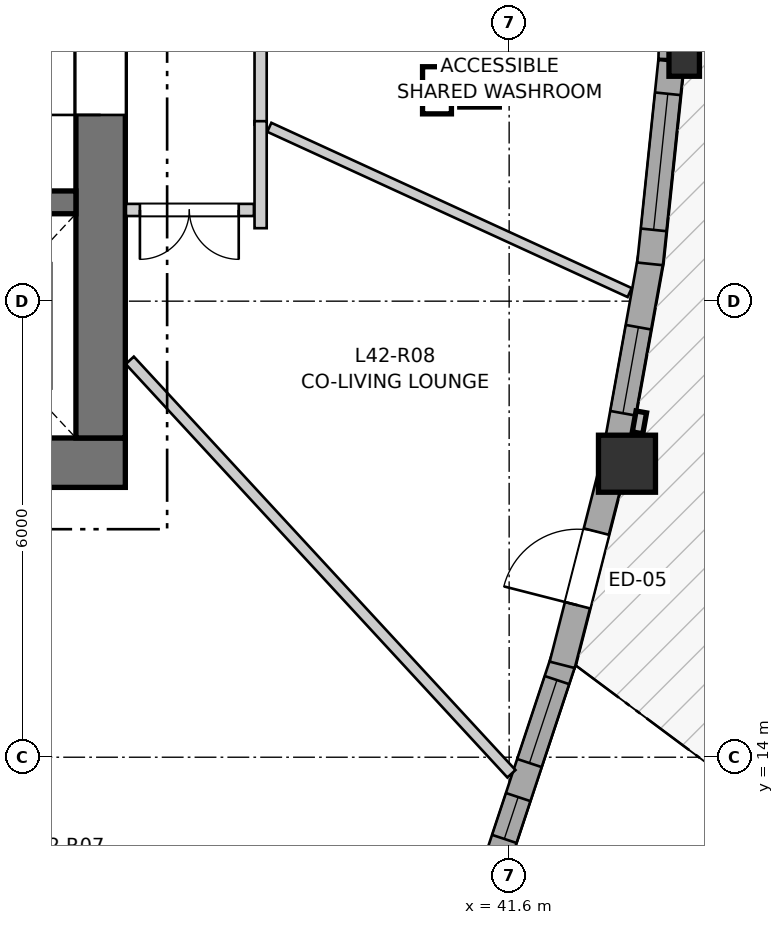
"""IFC4 building model, lengths in metres.
Left out: names, types, materials, properties, quantities, classifications, styles, units other than length and angle.
Written with IfcOpenShell. Run it as: python <this file> out.ifc"""

import sys

from ifc_helpers import new_model, si_unit, direction, frame, frame_2d, origin, origin_2d, place, context, subcontext, project, spatial, rectangle, i_section, extrude, source, transform, mapped, element, fill, save


model = new_model("IFC4")
c1 = context("Model", 3, precision=1e-05, world=origin(), true_north=direction((0.0, 1.0)))
c2 = subcontext(c1, "Body", "Model", "MODEL_VIEW")
j1 = project(units=[si_unit("LENGTHUNIT", "METRE"), si_unit("PLANEANGLEUNIT", "RADIAN")], contexts=[c1])
p1 = place(None, origin())
s1 = spatial("IfcSite", under=j1, at=p1, CompositionType="ELEMENT")
p2 = place(p1, origin())
s2 = spatial("IfcBuilding", under=s1, at=p2, CompositionType="ELEMENT")
p3 = place(p2, frame((0.0, 0.0, 142.6)))
s3 = spatial("IfcBuildingStorey", under=s2, at=p3, CompositionType="ELEMENT", Elevation=142.6)
p4 = place(p3, frame((24.15, 17.875, 0.0), z_axis=(0.0, 0.0, 1.0), x_axis=(1.0, 0.0, 0.0)))
e1 = element("IfcWall", 1, at=p4, inside=s3, PredefinedType="SHEAR", context=c2, shape_type="SweptSolid", body=[
    extrude(rectangle(XDim=12.4, YDim=0.65, at=frame_2d((6.2, 0.0))), origin(), (0.0, 0.0, 1.0), 2.95),
])
p5 = place(p3, frame((36.225, 18.2, 0.0), z_axis=(0.0, 0.0, 1.0), x_axis=(0.0, 1.0, 0.0)))
e2 = element("IfcWall", 2, at=p5, inside=s3, PredefinedType="SHEAR", context=c2, shape_type="SweptSolid", body=[
    extrude(rectangle(XDim=15.6, YDim=0.65, at=frame_2d((7.8, 0.0))), origin(), (0.0, 0.0, 1.0), 2.95),
])
p6 = place(p5, frame((4.25, 0.0, 0.0)))
e3 = element("IfcOpeningElement", 3, at=p6, cuts=e2, PredefinedType="OPENING", context=c2, shape_type="SweptSolid", body=[
    extrude(rectangle(XDim=1.1, YDim=2.15, at=frame_2d((0.55, 1.075))), frame((0.0, 0.335, 0.0), z_axis=(0.0, -1.0, 0.0), x_axis=(1.0, 0.0, 0.0)), (0.0, 0.0, 1.0), 0.67),
])
p7 = place(p5, frame((10.25, 0.0, 0.0)))
e4 = element("IfcOpeningElement", 4, at=p7, cuts=e2, PredefinedType="OPENING", context=c2, shape_type="SweptSolid", body=[
    extrude(rectangle(XDim=1.1, YDim=2.15, at=frame_2d((0.55, 1.075))), frame((0.0, 0.335, 0.0), z_axis=(0.0, -1.0, 0.0), x_axis=(1.0, 0.0, 0.0)), (0.0, 0.0, 1.0), 0.67),
])
p8 = place(p3, frame((24.8, 21.3, 0.0), z_axis=(0.0, 0.0, 1.0), x_axis=(1.0, 0.0, 0.0)))
e5 = element("IfcWall", 5, at=p8, inside=s3, PredefinedType="SHEAR", context=c2, shape_type="SweptSolid", body=[
    extrude(rectangle(XDim=11.1, YDim=0.3, at=frame_2d((5.55, 0.0))), origin(), (0.0, 0.0, 1.0), 2.95),
])
p9 = place(p8, frame((6.22, 0.0, 0.0)))
e6 = element("IfcOpeningElement", 6, at=p9, cuts=e5, PredefinedType="OPENING", context=c2, shape_type="SweptSolid", body=[
    extrude(rectangle(XDim=0.98, YDim=2.15, at=frame_2d((0.49, 1.075))), frame((0.0, 0.16, 0.0), z_axis=(0.0, -1.0, 0.0), x_axis=(1.0, 0.0, 0.0)), (0.0, 0.0, 1.0), 0.32),
])
p10 = place(p8, frame((9.15, 0.0, 0.0)))
e7 = element("IfcOpeningElement", 7, at=p10, cuts=e5, PredefinedType="OPENING", context=c2, shape_type="SweptSolid", body=[
    extrude(rectangle(XDim=1.15, YDim=2.15, at=frame_2d((0.575, 1.075))), frame((0.0, 0.16, 0.0), z_axis=(0.0, -1.0, 0.0), x_axis=(1.0, 0.0, 0.0)), (0.0, 0.0, 1.0), 0.32),
])
m1 = source(origin(), c2, "Body", "SweptSolid", [
    extrude(rectangle(XDim=0.75, YDim=0.75, at=origin_2d()), origin(), (0.0, 0.0, 1.0), 2.95),
])
p11 = place(p3, frame((43.15, 17.862, 0.0), z_axis=(0.0, 0.0, 1.0), x_axis=(1.0, 0.0, 0.0)))
e8 = element("IfcColumn", 8, at=p11, inside=s3, PredefinedType="COLUMN", context=c2, shape_type="MappedRepresentation", body=[
    mapped(m1, transform((0.0, 0.0, 0.0), x_axis=(1.0, 0.0, 0.0), y_axis=(0.0, 1.0, 0.0), z_axis=(0.0, 0.0, 1.0), scale=1.0)),
])
m2 = source(origin(), c2, "Body", "SweptSolid", [
    extrude(i_section(OverallWidth=0.401, OverallDepth=0.399, WebThickness=0.023, FlangeThickness=0.036, FilletRadius=0.015, at=origin_2d()), origin(), (0.0, 0.0, 1.0), 2.95),
])
p12 = place(p3, frame((43.903, 23.158, 0.0), z_axis=(0.0, 0.0, 1.0), x_axis=(1.0, 0.0, 0.0)))
e9 = element("IfcColumn", 9, at=p12, inside=s3, PredefinedType="PILASTER", context=c2, shape_type="MappedRepresentation", body=[
    mapped(m2, transform((0.0, 0.0, 0.0), x_axis=(1.0, 0.0, 0.0), y_axis=(0.0, 1.0, 0.0), z_axis=(0.0, 0.0, 1.0), scale=1.0)),
])
p13 = place(p3, frame((41.438, 12.629, 0.0), z_axis=(0.0, 0.0, 1.0), x_axis=(0.314534815528, 0.949245937479, 0.0)))
e10 = element("IfcWall", 10, at=p13, inside=s3, PredefinedType="SOLIDWALL", context=c2, shape_type="SweptSolid", body=[
    extrude(rectangle(XDim=2.813, YDim=0.34, at=frame_2d((1.406, 0.0))), origin(), (0.0, 0.0, 1.0), 2.53),
])
p14 = place(p13, frame((0.312, 0.0, 0.82)))
e11 = element("IfcOpeningElement", 11, at=p14, cuts=e10, PredefinedType="OPENING", context=c2, shape_type="SweptSolid", body=[
    extrude(rectangle(XDim=0.58, YDim=1.35, at=frame_2d((0.29, 0.675))), frame((0.0, 0.18, 0.0), z_axis=(0.0, -1.0, 0.0), x_axis=(1.0, 0.0, 0.0)), (0.0, 0.0, 1.0), 0.36),
])
p15 = place(p13, frame((1.363, 0.0, 0.82)))
e12 = element("IfcOpeningElement", 12, at=p15, cuts=e10, PredefinedType="OPENING", context=c2, shape_type="SweptSolid", body=[
    extrude(rectangle(XDim=1.15, YDim=1.2, at=frame_2d((0.575, 0.6))), frame((0.0, 0.18, 0.0), z_axis=(0.0, -1.0, 0.0), x_axis=(1.0, 0.0, 0.0)), (0.0, 0.0, 1.0), 0.36),
])
p16 = place(p3, frame((42.298, 15.215, 0.0), z_axis=(0.0, 0.0, 1.0), x_axis=(0.24779460158, 0.968812590457, 0.0)))
e13 = element("IfcWall", 13, at=p16, inside=s3, PredefinedType="SOLIDWALL", context=c2, shape_type="SweptSolid", body=[
    extrude(rectangle(XDim=2.62, YDim=0.34, at=frame_2d((1.31, 0.0))), origin(), (0.0, 0.0, 1.0), 2.53),
])
p17 = place(p16, frame((0.81, 0.0, 0.0)))
e14 = element("IfcOpeningElement", 14, at=p17, cuts=e13, PredefinedType="OPENING", context=c2, shape_type="SweptSolid", body=[
    extrude(rectangle(XDim=1.0, YDim=2.1, at=frame_2d((0.5, 1.05))), frame((0.0, 0.18, 0.0), z_axis=(0.0, -1.0, 0.0), x_axis=(1.0, 0.0, 0.0)), (0.0, 0.0, 1.0), 0.36),
])
p18 = place(p3, frame((43.01, 18.044, 0.0), z_axis=(0.0, 0.0, 1.0), x_axis=(0.177116262048, 0.984189935794, 0.0)))
e15 = element("IfcWall", 15, at=p18, inside=s3, PredefinedType="SOLIDWALL", context=c2, shape_type="SweptSolid", body=[
    extrude(rectangle(XDim=2.575, YDim=0.34, at=frame_2d((1.288, 0.0))), origin(), (0.0, 0.0, 1.0), 2.53),
])
p19 = place(p18, frame((0.489, 0.0, 0.82)))
e16 = element("IfcOpeningElement", 16, at=p19, cuts=e15, PredefinedType="OPENING", context=c2, shape_type="SweptSolid", body=[
    extrude(rectangle(XDim=1.15, YDim=1.2, at=frame_2d((0.575, 0.6))), frame((0.0, 0.18, 0.0), z_axis=(0.0, -1.0, 0.0), x_axis=(1.0, 0.0, 0.0)), (0.0, 0.0, 1.0), 0.36),
])
p20 = place(p3, frame((43.454, 20.49, 0.0), z_axis=(0.0, 0.0, 1.0), x_axis=(0.103669919384, 0.994611757328, 0.0)))
e17 = element("IfcWall", 17, at=p20, inside=s3, PredefinedType="SOLIDWALL", context=c2, shape_type="SweptSolid", body=[
    extrude(rectangle(XDim=2.68, YDim=0.34, at=frame_2d((1.34, 0.0))), origin(), (0.0, 0.0, 1.0), 2.53),
])
p21 = place(p20, frame((0.45, 0.0, 0.82)))
e18 = element("IfcOpeningElement", 18, at=p21, cuts=e17, PredefinedType="OPENING", context=c2, shape_type="SweptSolid", body=[
    extrude(rectangle(XDim=1.8, YDim=1.45, at=frame_2d((0.9, 0.725))), frame((0.0, 0.18, 0.0), z_axis=(0.0, -1.0, 0.0), x_axis=(1.0, 0.0, 0.0)), (0.0, 0.0, 1.0), 0.36),
])
p22 = place(p3, frame((43.734, 23.183, 0.0), z_axis=(0.0, 0.0, 1.0), x_axis=(0.028311286797, 0.999599155182, 0.0)))
e19 = element("IfcWall", 19, at=p22, inside=s3, PredefinedType="SOLIDWALL", context=c2, shape_type="SweptSolid", body=[
    extrude(rectangle(XDim=2.665, YDim=0.34, at=frame_2d((1.332, 0.0))), origin(), (0.0, 0.0, 1.0), 2.53),
])
p23 = place(p22, frame((0.323, 0.0, 0.82)))
e20 = element("IfcOpeningElement", 20, at=p23, cuts=e19, PredefinedType="OPENING", context=c2, shape_type="SweptSolid", body=[
    extrude(rectangle(XDim=1.05, YDim=1.45, at=frame_2d((0.525, 0.725))), frame((0.0, 0.18, 0.0), z_axis=(0.0, -1.0, 0.0), x_axis=(1.0, 0.0, 0.0)), (0.0, 0.0, 1.0), 0.36),
])
p24 = place(p3, frame((38.33, 25.213, 0.0), z_axis=(0.0, 0.0, 1.0), x_axis=(0.0, -1.0, 0.0)))
e21 = element("IfcWall", 21, at=p24, inside=s3, PredefinedType="PARTITIONING", context=c2, shape_type="SweptSolid", body=[
    extrude(rectangle(XDim=2.89, YDim=0.16, at=frame_2d((1.445, 0.0))), origin(), (0.0, 0.0, 1.0), 2.95),
])
p25 = place(p24, frame((0.946, 0.0, 0.0)))
e22 = element("IfcOpeningElement", 22, at=p25, cuts=e21, PredefinedType="OPENING", context=c2, shape_type="SweptSolid", body=[
    extrude(rectangle(XDim=0.95, YDim=2.1, at=frame_2d((0.475, 1.05))), frame((0.0, 0.09, 0.0), z_axis=(0.0, -1.0, 0.0), x_axis=(1.0, 0.0, 0.0)), (0.0, 0.0, 1.0), 0.18),
])
p26 = place(p3, frame((38.242, 21.2, 0.0), z_axis=(0.0, 0.0, 1.0), x_axis=(-1.0, 0.0, 0.0)))
e23 = element("IfcWall", 23, at=p26, inside=s3, PredefinedType="PARTITIONING", context=c2, shape_type="SweptSolid", body=[
    extrude(rectangle(XDim=1.684, YDim=0.16, at=frame_2d((0.842, 0.0))), origin(), (0.0, 0.0, 1.0), 2.95),
])
p27 = place(p26, frame((0.2, 0.0, 0.0)))
e24 = element("IfcOpeningElement", 24, at=p27, cuts=e23, PredefinedType="OPENING", context=c2, shape_type="SweptSolid", body=[
    extrude(rectangle(XDim=1.3, YDim=2.1, at=frame_2d((0.65, 1.05))), frame((0.0, 0.09, 0.0), z_axis=(0.0, -1.0, 0.0), x_axis=(1.0, 0.0, 0.0)), (0.0, 0.0, 1.0), 0.18),
])
p28 = place(p3, frame((36.609, 19.221, 0.0), z_axis=(0.0, 0.0, 1.0), x_axis=(0.67832941292, -0.734757924467, 0.0)))
e25 = element("IfcWall", 25, at=p28, inside=s3, PredefinedType="PARTITIONING", context=c2, shape_type="SweptSolid", body=[
    extrude(rectangle(XDim=7.403, YDim=0.145, at=frame_2d((3.701, 0.0))), origin(), (0.0, 0.0, 1.0), 2.95),
])
p29 = place(p3, frame((38.444, 22.288, 0.0), z_axis=(0.0, 0.0, 1.0), x_axis=(0.908945866603, -0.416914153736, 0.0)))
e26 = element("IfcWall", 26, at=p29, inside=s3, PredefinedType="PARTITIONING", context=c2, shape_type="SweptSolid", body=[
    extrude(rectangle(XDim=5.217, YDim=0.13, at=frame_2d((2.608, 0.0))), origin(), (0.0, 0.0, 1.0), 2.95),
])
p30 = place(p3, frame((38.33, 20.96, 0.0), z_axis=(0.0, 0.0, 1.0), x_axis=(0.0, 1.0, 0.0)))
e27 = element("IfcWall", 27, at=p30, inside=s3, PredefinedType="PARTITIONING", context=c2, shape_type="SweptSolid", body=[
    extrude(rectangle(XDim=1.408, YDim=0.16, at=frame_2d((0.704, 0.0))), origin(), (0.0, 0.0, 1.0), 2.95),
])
m3 = source(origin(), c2, "Body", "SweptSolid", [
    extrude(rectangle(XDim=0.58, YDim=1.35, at=frame_2d((0.29, 0.675))), frame((0.0, 0.03, 0.0), z_axis=(0.0, -1.0, 0.0), x_axis=(1.0, 0.0, 0.0)), (0.0, 0.0, 1.0), 0.06),
])
p31 = place(p14, origin())
e28 = element("IfcWindow", 28, at=p31, inside=s3, PartitioningType="SINGLE_PANEL", PredefinedType="WINDOW", context=c2, shape_type="MappedRepresentation", body=[
    mapped(m3, transform((0.0, 0.0, 0.0), x_axis=(1.0, 0.0, 0.0), y_axis=(0.0, 1.0, 0.0), z_axis=(0.0, 0.0, 1.0), scale=1.0)),
])
fill(e11, e28)
m4 = source(origin(), c2, "Body", "SweptSolid", [
    extrude(rectangle(XDim=1.15, YDim=1.2, at=frame_2d((0.575, 0.6))), frame((0.0, 0.03, 0.0), z_axis=(0.0, -1.0, 0.0), x_axis=(1.0, 0.0, 0.0)), (0.0, 0.0, 1.0), 0.06),
])
p32 = place(p15, origin())
e29 = element("IfcWindow", 29, at=p32, inside=s3, PartitioningType="SINGLE_PANEL", PredefinedType="WINDOW", context=c2, shape_type="MappedRepresentation", body=[
    mapped(m4, transform((0.0, 0.0, 0.0), x_axis=(1.0, 0.0, 0.0), y_axis=(0.0, 1.0, 0.0), z_axis=(0.0, 0.0, 1.0), scale=1.0)),
])
fill(e12, e29)
p33 = place(p19, origin())
e30 = element("IfcWindow", 30, at=p33, inside=s3, PartitioningType="SINGLE_PANEL", PredefinedType="WINDOW", context=c2, shape_type="MappedRepresentation", body=[
    mapped(m4, transform((0.0, 0.0, 0.0), x_axis=(1.0, 0.0, 0.0), y_axis=(0.0, 1.0, 0.0), z_axis=(0.0, 0.0, 1.0), scale=1.0)),
])
fill(e16, e30)
m5 = source(origin(), c2, "Body", "SweptSolid", [
    extrude(rectangle(XDim=1.8, YDim=1.45, at=frame_2d((0.9, 0.725))), frame((0.0, 0.03, 0.0), z_axis=(0.0, -1.0, 0.0), x_axis=(1.0, 0.0, 0.0)), (0.0, 0.0, 1.0), 0.06),
])
p34 = place(p21, origin())
e31 = element("IfcWindow", 31, at=p34, inside=s3, PartitioningType="SINGLE_PANEL", PredefinedType="WINDOW", context=c2, shape_type="MappedRepresentation", body=[
    mapped(m5, transform((0.0, 0.0, 0.0), x_axis=(1.0, 0.0, 0.0), y_axis=(0.0, 1.0, 0.0), z_axis=(0.0, 0.0, 1.0), scale=1.0)),
])
fill(e18, e31)
m6 = source(origin(), c2, "Body", "SweptSolid", [
    extrude(rectangle(XDim=1.0, YDim=2.1, at=frame_2d((0.5, 1.05))), frame((0.0, 0.025, 0.0), z_axis=(0.0, -1.0, 0.0), x_axis=(1.0, 0.0, 0.0)), (0.0, 0.0, 1.0), 0.05),
])
p35 = place(p17, origin())
e32 = element("IfcDoor", 32, at=p35, inside=s3, OperationType="SINGLE_SWING_LEFT", PredefinedType="DOOR", context=c2, shape_type="MappedRepresentation", body=[
    mapped(m6, transform((0.0, 0.0, 0.0), x_axis=(1.0, 0.0, 0.0), y_axis=(0.0, 1.0, 0.0), z_axis=(0.0, 0.0, 1.0), scale=1.0)),
])
fill(e14, e32)
m7 = source(origin(), c2, "Body", "SweptSolid", [
    extrude(rectangle(XDim=1.1, YDim=2.15, at=frame_2d((0.55, 1.075))), frame((0.0, 0.025, 0.0), z_axis=(0.0, -1.0, 0.0), x_axis=(1.0, 0.0, 0.0)), (0.0, 0.0, 1.0), 0.05),
])
p36 = place(p6, origin())
e33 = element("IfcDoor", 33, at=p36, inside=s3, OperationType="SINGLE_SWING_LEFT", PredefinedType="DOOR", context=c2, shape_type="MappedRepresentation", body=[
    mapped(m7, transform((0.0, 0.0, 0.0), x_axis=(1.0, 0.0, 0.0), y_axis=(0.0, 1.0, 0.0), z_axis=(0.0, 0.0, 1.0), scale=1.0)),
])
fill(e3, e33)
m8 = source(origin(), c2, "Body", "SweptSolid", [
    extrude(rectangle(XDim=1.3, YDim=2.1, at=frame_2d((0.65, 1.05))), frame((0.0, 0.025, 0.0), z_axis=(0.0, -1.0, 0.0), x_axis=(1.0, 0.0, 0.0)), (0.0, 0.0, 1.0), 0.05),
])
p37 = place(p27, origin())
e34 = element("IfcDoor", 34, at=p37, inside=s3, OperationType="DOUBLE_DOOR_SINGLE_SWING", PredefinedType="DOOR", context=c2, shape_type="MappedRepresentation", body=[
    mapped(m8, transform((0.0, 0.0, 0.0), x_axis=(1.0, 0.0, 0.0), y_axis=(0.0, 1.0, 0.0), z_axis=(0.0, 0.0, 1.0), scale=1.0)),
])
fill(e24, e34)
save(model, sys.argv[1])
